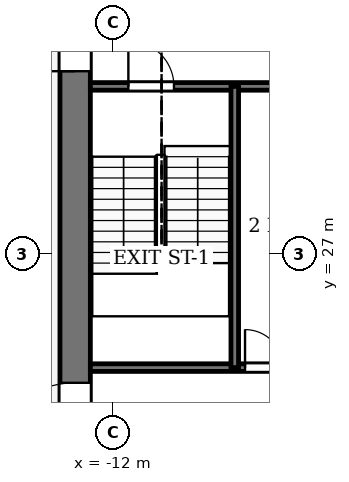
"""IFC4 building model, lengths in metres.
Left out: names, types, materials, properties, quantities, classifications, styles, units other than length and angle.
Written with IfcOpenShell. Run it as: python <this file> out.ifc"""

import sys

from ifc_helpers import new_model, si_unit, direction, frame, frame_2d, origin, place, context, subcontext, project, spatial, rectangle, extrude, element, fill, save


model = new_model("IFC4")
c1 = context("Model", 3, precision=1e-05, world=origin(), true_north=direction((0.0, 1.0)))
c2 = subcontext(c1, "Body", "Model", "MODEL_VIEW")
j1 = project(units=[si_unit("LENGTHUNIT", "METRE"), si_unit("PLANEANGLEUNIT", "RADIAN")], contexts=[c1])
p1 = place(None, origin())
s1 = spatial("IfcSite", under=j1, at=p1, CompositionType="ELEMENT")
p2 = place(p1, origin())
s2 = spatial("IfcBuilding", under=s1, at=p2, CompositionType="ELEMENT")
p3 = place(p2, frame((0.0, 0.0, 258.0)))
s3 = spatial("IfcBuildingStorey", under=s2, at=p3, CompositionType="ELEMENT", Elevation=258.0)
p4 = place(p3, frame((-13.0, 18.4, -0.13), z_axis=(0.0, 0.0, 1.0), x_axis=(0.0, 1.0, 0.0)))
e1 = element("IfcWall", 1, at=p4, inside=s3, PredefinedType="SHEAR", context=c2, shape_type="SweptSolid", body=[
    extrude(rectangle(XDim=19.2, YDim=0.8, at=frame_2d((9.6, 0.0))), origin(), (0.0, 0.0, 1.0), 4.0),
])
p5 = place(p4, frame((2.8, 0.0, 0.13)))
e2 = element("IfcOpeningElement", 2, at=p5, cuts=e1, PredefinedType="OPENING", context=c2, shape_type="SweptSolid", body=[
    extrude(rectangle(XDim=2.4, YDim=2.4, at=frame_2d((1.2, 1.2))), frame((0.0, 0.41, 0.0), z_axis=(0.0, -1.0, 0.0), x_axis=(1.0, 0.0, 0.0)), (0.0, 0.0, 1.0), 0.82),
])
p6 = place(p4, frame((13.4, 0.0, 0.13)))
e3 = element("IfcOpeningElement", 3, at=p6, cuts=e1, PredefinedType="OPENING", context=c2, shape_type="SweptSolid", body=[
    extrude(rectangle(XDim=1.4, YDim=2.2, at=frame_2d((0.7, 1.1))), frame((0.0, 0.41, 0.0), z_axis=(0.0, -1.0, 0.0), x_axis=(1.0, 0.0, 0.0)), (0.0, 0.0, 1.0), 0.82),
])
p7 = place(p3, frame((-12.6, 24.0, 0.0), z_axis=(0.0, 0.0, 1.0), x_axis=(1.0, 0.0, 0.0)))
e4 = element("IfcWall", 4, at=p7, inside=s3, PredefinedType="PARTITIONING", context=c2, shape_type="SweptSolid", body=[
    extrude(rectangle(XDim=6.6, YDim=0.2, at=frame_2d((3.3, 0.0))), origin(), (0.0, 0.0, 1.0), 3.87),
])
p8 = place(p7, frame((4.07, 0.0, 0.0)))
e5 = element("IfcOpeningElement", 5, at=p8, cuts=e4, PredefinedType="OPENING", context=c2, shape_type="SweptSolid", body=[
    extrude(rectangle(XDim=1.0, YDim=2.1, at=frame_2d((0.5, 1.05))), frame((0.0, 0.11, 0.0), z_axis=(0.0, -1.0, 0.0), x_axis=(1.0, 0.0, 0.0)), (0.0, 0.0, 1.0), 0.22),
])
p9 = place(p7, frame((5.57, 0.0, 0.0)))
e6 = element("IfcOpeningElement", 6, at=p9, cuts=e4, PredefinedType="OPENING", context=c2, shape_type="SweptSolid", body=[
    extrude(rectangle(XDim=0.8, YDim=2.1, at=frame_2d((0.4, 1.05))), frame((0.0, 0.11, 0.0), z_axis=(0.0, -1.0, 0.0), x_axis=(1.0, 0.0, 0.0)), (0.0, 0.0, 1.0), 0.22),
])
p10 = place(p3, frame((-12.6, 31.4, 0.0), z_axis=(0.0, 0.0, 1.0), x_axis=(1.0, 0.0, 0.0)))
e7 = element("IfcWall", 7, at=p10, inside=s3, PredefinedType="PARTITIONING", context=c2, shape_type="SweptSolid", body=[
    extrude(rectangle(XDim=6.6, YDim=0.2, at=frame_2d((3.3, 0.0))), origin(), (0.0, 0.0, 1.0), 3.87),
])
p11 = place(p10, frame((1.0, 0.0, 0.0)))
e8 = element("IfcOpeningElement", 8, at=p11, cuts=e7, PredefinedType="OPENING", context=c2, shape_type="SweptSolid", body=[
    extrude(rectangle(XDim=1.2, YDim=2.2, at=frame_2d((0.6, 1.1))), frame((0.0, 0.11, 0.0), z_axis=(0.0, -1.0, 0.0), x_axis=(1.0, 0.0, 0.0)), (0.0, 0.0, 1.0), 0.22),
])
p12 = place(p3, frame((-8.8, 24.0, 0.0), z_axis=(0.0, 0.0, 1.0), x_axis=(0.0, 1.0, 0.0)))
e9 = element("IfcWall", 9, at=p12, inside=s3, PredefinedType="PARTITIONING", context=c2, shape_type="SweptSolid", body=[
    extrude(rectangle(XDim=7.4, YDim=0.2, at=frame_2d((3.7, 0.0))), origin(), (0.0, 0.0, 1.0), 3.87),
])
p13 = place(p8, origin())
e10 = element("IfcDoor", 10, at=p13, inside=s3, OperationType="SINGLE_SWING_RIGHT", PredefinedType="DOOR", context=c2, shape_type="SweptSolid", body=[
    extrude(rectangle(XDim=1.0, YDim=2.1, at=frame_2d((0.5, 1.05))), frame((0.0, 0.025, 0.0), z_axis=(0.0, -1.0, 0.0), x_axis=(1.0, 0.0, 0.0)), (0.0, 0.0, 1.0), 0.05),
])
fill(e5, e10)
p14 = place(p11, origin())
e11 = element("IfcDoor", 11, at=p14, inside=s3, OperationType="SINGLE_SWING_RIGHT", PredefinedType="DOOR", context=c2, shape_type="SweptSolid", body=[
    extrude(rectangle(XDim=1.2, YDim=2.2, at=frame_2d((0.6, 1.1))), frame((0.0, 0.025, 0.0), z_axis=(0.0, -1.0, 0.0), x_axis=(1.0, 0.0, 0.0)), (0.0, 0.0, 1.0), 0.05),
])
fill(e8, e11)
p15 = place(p5, origin())
e12 = element("IfcDoor", 12, at=p15, inside=s3, OperationType="DOUBLE_DOOR_SINGLE_SWING", PredefinedType="DOOR", context=c2, shape_type="SweptSolid", body=[
    extrude(rectangle(XDim=2.4, YDim=2.4, at=frame_2d((1.2, 1.2))), frame((0.0, 0.025, 0.0), z_axis=(0.0, -1.0, 0.0), x_axis=(1.0, 0.0, 0.0)), (0.0, 0.0, 1.0), 0.05),
])
fill(e2, e12)
p16 = place(p6, origin())
e13 = element("IfcDoor", 13, at=p16, inside=s3, OperationType="SINGLE_SWING_RIGHT", PredefinedType="DOOR", context=c2, shape_type="SweptSolid", body=[
    extrude(rectangle(XDim=1.4, YDim=2.2, at=frame_2d((0.7, 1.1))), frame((0.0, 0.025, 0.0), z_axis=(0.0, -1.0, 0.0), x_axis=(1.0, 0.0, 0.0)), (0.0, 0.0, 1.0), 0.05),
])
fill(e3, e13)
save(model, sys.argv[1])
